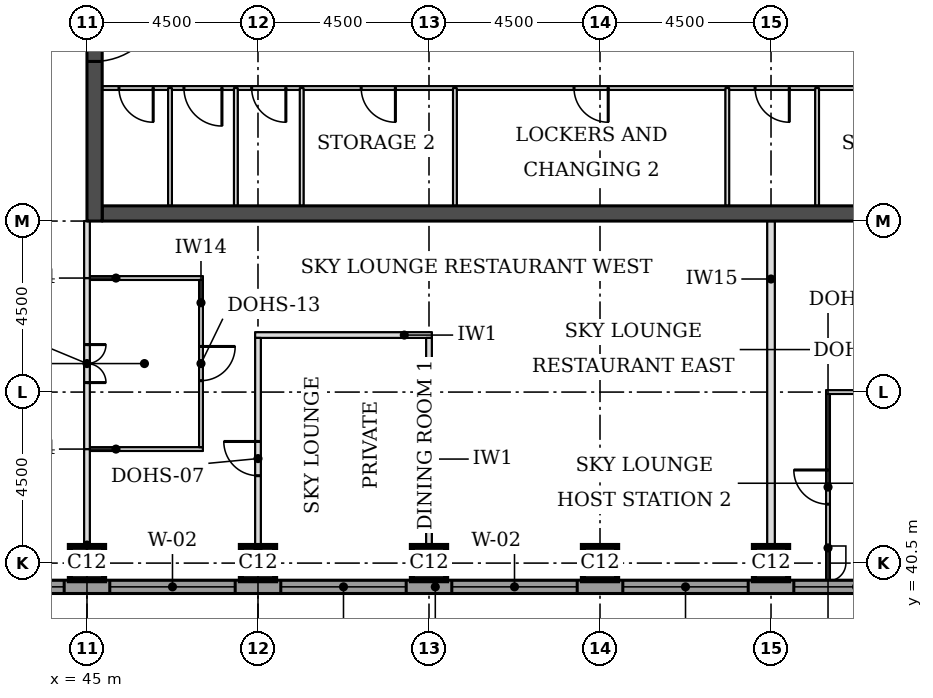
"""IFC4 building model, lengths in metres.
Left out: names, types, materials, properties, quantities, classifications, styles, units other than length and angle.
Written with IfcOpenShell. Run it as: python <this file> out.ifc"""

import sys

from ifc_helpers import new_model, si_unit, direction, frame, frame_2d, origin, origin_2d, place, context, subcontext, project, spatial, rectangle, extrude, element, fill, save


model = new_model("IFC4")
c1 = context("Model", 3, precision=1e-05, world=origin(), true_north=direction((0.0, 1.0)))
c2 = subcontext(c1, "Body", "Model", "MODEL_VIEW")
j1 = project(units=[si_unit("LENGTHUNIT", "METRE"), si_unit("PLANEANGLEUNIT", "RADIAN")], contexts=[c1])
p1 = place(None, origin())
s1 = spatial("IfcSite", under=j1, at=p1, CompositionType="ELEMENT")
p2 = place(p1, origin())
s2 = spatial("IfcBuilding", under=s1, at=p2, CompositionType="ELEMENT")
p3 = place(p2, frame((0.0, 0.0, 260.0)))
s3 = spatial("IfcBuildingStorey", under=s2, at=p3, CompositionType="ELEMENT", Elevation=260.0)
for number, where, z_axis, x_axis in (
    (1, (45.0, 40.5, 0.0), (0.0, 0.0, 1.0), (1.0, 0.0, 0.0)),
    (2, (49.5, 40.5, 0.0), (0.0, 0.0, 1.0), (1.0, 0.0, 0.0)),
    (3, (54.0, 40.5, 0.0), (0.0, 0.0, 1.0), (1.0, 0.0, 0.0)),
    (4, (58.5, 40.5, 0.0), (0.0, 0.0, 1.0), (1.0, 0.0, 0.0)),
    (5, (63.0, 40.5, 0.0), (0.0, 0.0, 1.0), (1.0, 0.0, 0.0)),
):
    element("IfcColumn", number, at=place(p3, frame(where, z_axis=z_axis, x_axis=x_axis)), inside=s3, PredefinedType="COLUMN", context=c2, shape_type="SweptSolid", body=[
        extrude(rectangle(XDim=0.9, YDim=0.9, at=origin_2d()), origin(), (0.0, 0.0, 1.0), 3.7),
    ])
p4 = place(p3, frame((45.4, 49.7, 0.0), z_axis=(0.0, 0.0, 1.0), x_axis=(1.0, 0.0, 0.0)))
e6 = element("IfcWall", 6, at=p4, inside=s3, PredefinedType="SHEAR", context=c2, shape_type="SweptSolid", body=[
    extrude(rectangle(XDim=21.7, YDim=0.4, at=frame_2d((10.85, 0.0))), origin(), (0.0, 0.0, 1.0), 3.7),
])
p5 = place(p3, frame((45.2, 49.5, 0.0), z_axis=(0.0, 0.0, 1.0), x_axis=(0.0, 1.0, 0.0)))
e7 = element("IfcWall", 7, at=p5, inside=s3, PredefinedType="SHEAR", context=c2, shape_type="SweptSolid", body=[
    extrude(rectangle(XDim=22.5, YDim=0.4, at=frame_2d((11.25, 0.0))), origin(), (0.0, 0.0, 1.0), 3.7),
])
p6 = place(p5, frame((4.2, 0.0, 0.0)))
e8 = element("IfcOpeningElement", 8, at=p6, cuts=e7, PredefinedType="OPENING", context=c2, shape_type="SweptSolid", body=[
    extrude(rectangle(XDim=1.8, YDim=2.1, at=frame_2d((0.9, 1.05))), frame((0.0, 0.21, 0.0), z_axis=(0.0, -1.0, 0.0), x_axis=(1.0, 0.0, 0.0)), (0.0, 0.0, 1.0), 0.42),
])
p7 = place(p5, frame((6.9, 0.0, 0.0)))
e9 = element("IfcOpeningElement", 9, at=p7, cuts=e7, PredefinedType="OPENING", context=c2, shape_type="SweptSolid", body=[
    extrude(rectangle(XDim=1.1, YDim=2.1, at=frame_2d((0.55, 1.05))), frame((0.0, 0.21, 0.0), z_axis=(0.0, -1.0, 0.0), x_axis=(1.0, 0.0, 0.0)), (0.0, 0.0, 1.0), 0.42),
])
p8 = place(p5, frame((13.6, 0.0, 0.0)))
e10 = element("IfcOpeningElement", 10, at=p8, cuts=e7, PredefinedType="OPENING", context=c2, shape_type="SweptSolid", body=[
    extrude(rectangle(XDim=1.1, YDim=2.1, at=frame_2d((0.55, 1.05))), frame((0.0, 0.21, 0.0), z_axis=(0.0, -1.0, 0.0), x_axis=(1.0, 0.0, 0.0)), (0.0, 0.0, 1.0), 0.42),
])
p9 = place(p5, frame((16.5, 0.0, 0.0)))
e11 = element("IfcOpeningElement", 11, at=p9, cuts=e7, PredefinedType="OPENING", context=c2, shape_type="SweptSolid", body=[
    extrude(rectangle(XDim=1.8, YDim=2.1, at=frame_2d((0.9, 1.05))), frame((0.0, 0.21, 0.0), z_axis=(0.0, -1.0, 0.0), x_axis=(1.0, 0.0, 0.0)), (0.0, 0.0, 1.0), 0.42),
])
p10 = place(p3, frame((36.0, 39.875, 0.0), z_axis=(0.0, 0.0, 1.0), x_axis=(1.0, 0.0, 0.0)))
e12 = element("IfcWall", 12, at=p10, inside=s3, PredefinedType="STANDARD", context=c2, shape_type="SweptSolid", body=[
    extrude(rectangle(XDim=36.331, YDim=0.35, at=frame_2d((18.166, 0.0))), origin(), (0.0, 0.0, 1.0), 3.425),
])
p11 = place(p10, frame((0.6, 0.0, 0.9)))
e13 = element("IfcOpeningElement", 13, at=p11, cuts=e12, PredefinedType="OPENING", context=c2, shape_type="SweptSolid", body=[
    extrude(rectangle(XDim=3.3, YDim=1.9, at=frame_2d((1.65, 0.95))), frame((0.0, 0.185, 0.0), z_axis=(0.0, -1.0, 0.0), x_axis=(1.0, 0.0, 0.0)), (0.0, 0.0, 1.0), 0.37),
])
p12 = place(p10, frame((5.1, 0.0, 0.9)))
e14 = element("IfcOpeningElement", 14, at=p12, cuts=e12, PredefinedType="OPENING", context=c2, shape_type="SweptSolid", body=[
    extrude(rectangle(XDim=3.3, YDim=1.9, at=frame_2d((1.65, 0.95))), frame((0.0, 0.185, 0.0), z_axis=(0.0, -1.0, 0.0), x_axis=(1.0, 0.0, 0.0)), (0.0, 0.0, 1.0), 0.37),
])
p13 = place(p10, frame((9.6, 0.0, 0.9)))
e15 = element("IfcOpeningElement", 15, at=p13, cuts=e12, PredefinedType="OPENING", context=c2, shape_type="SweptSolid", body=[
    extrude(rectangle(XDim=3.3, YDim=1.9, at=frame_2d((1.65, 0.95))), frame((0.0, 0.185, 0.0), z_axis=(0.0, -1.0, 0.0), x_axis=(1.0, 0.0, 0.0)), (0.0, 0.0, 1.0), 0.37),
])
p14 = place(p10, frame((14.1, 0.0, 0.9)))
e16 = element("IfcOpeningElement", 16, at=p14, cuts=e12, PredefinedType="OPENING", context=c2, shape_type="SweptSolid", body=[
    extrude(rectangle(XDim=3.3, YDim=1.9, at=frame_2d((1.65, 0.95))), frame((0.0, 0.185, 0.0), z_axis=(0.0, -1.0, 0.0), x_axis=(1.0, 0.0, 0.0)), (0.0, 0.0, 1.0), 0.37),
])
p15 = place(p10, frame((18.6, 0.0, 0.9)))
e17 = element("IfcOpeningElement", 17, at=p15, cuts=e12, PredefinedType="OPENING", context=c2, shape_type="SweptSolid", body=[
    extrude(rectangle(XDim=3.3, YDim=1.9, at=frame_2d((1.65, 0.95))), frame((0.0, 0.185, 0.0), z_axis=(0.0, -1.0, 0.0), x_axis=(1.0, 0.0, 0.0)), (0.0, 0.0, 1.0), 0.37),
])
p16 = place(p10, frame((23.1, 0.0, 0.9)))
e18 = element("IfcOpeningElement", 18, at=p16, cuts=e12, PredefinedType="OPENING", context=c2, shape_type="SweptSolid", body=[
    extrude(rectangle(XDim=3.3, YDim=1.9, at=frame_2d((1.65, 0.95))), frame((0.0, 0.185, 0.0), z_axis=(0.0, -1.0, 0.0), x_axis=(1.0, 0.0, 0.0)), (0.0, 0.0, 1.0), 0.37),
])
p17 = place(p10, frame((27.6, 0.0, 0.9)))
e19 = element("IfcOpeningElement", 19, at=p17, cuts=e12, PredefinedType="OPENING", context=c2, shape_type="SweptSolid", body=[
    extrude(rectangle(XDim=3.3, YDim=1.9, at=frame_2d((1.65, 0.95))), frame((0.0, 0.185, 0.0), z_axis=(0.0, -1.0, 0.0), x_axis=(1.0, 0.0, 0.0)), (0.0, 0.0, 1.0), 0.37),
])
p18 = place(p10, frame((32.1, 0.0, 0.9)))
e20 = element("IfcOpeningElement", 20, at=p18, cuts=e12, PredefinedType="OPENING", context=c2, shape_type="SweptSolid", body=[
    extrude(rectangle(XDim=3.3, YDim=1.9, at=frame_2d((1.65, 0.95))), frame((0.0, 0.185, 0.0), z_axis=(0.0, -1.0, 0.0), x_axis=(1.0, 0.0, 0.0)), (0.0, 0.0, 1.0), 0.37),
])
for number, where, z_axis, x_axis in (
    (21, (45.075, 43.5, 0.0), (0.0, 0.0, 1.0), (1.0, 0.0, 0.0)),
    (22, (64.45, 45.0, 0.0), (0.0, 0.0, 1.0), (1.0, 0.0, 0.0)),
):
    element("IfcWall", number, at=place(p3, frame(where, z_axis=z_axis, x_axis=x_axis)), inside=s3, PredefinedType="PARTITIONING", context=c2, shape_type="SweptSolid", body=[
        extrude(rectangle(XDim=2.975, YDim=0.1, at=frame_2d((1.488, 0.0))), origin(), (0.0, 0.0, 1.0), 3.45),
    ])
p19 = place(p3, frame((49.425, 46.5, 0.0), z_axis=(0.0, 0.0, 1.0), x_axis=(1.0, 0.0, 0.0)))
e23 = element("IfcWall", 23, at=p19, inside=s3, PredefinedType="PARTITIONING", context=c2, shape_type="SweptSolid", body=[
    extrude(rectangle(XDim=4.65, YDim=0.15, at=frame_2d((2.325, 0.0))), origin(), (0.0, 0.0, 1.0), 3.45),
])
p20 = place(p3, frame((45.075, 48.0, 0.0), z_axis=(0.0, 0.0, 1.0), x_axis=(1.0, 0.0, 0.0)))
e24 = element("IfcWall", 24, at=p20, inside=s3, PredefinedType="PARTITIONING", context=c2, shape_type="SweptSolid", body=[
    extrude(rectangle(XDim=2.975, YDim=0.1, at=frame_2d((1.488, 0.0))), origin(), (0.0, 0.0, 1.0), 3.45),
])
p21 = place(p3, frame((45.0, 40.05, 0.0), z_axis=(0.0, 0.0, 1.0), x_axis=(0.0, 1.0, 0.0)))
e25 = element("IfcWall", 25, at=p21, inside=s3, PredefinedType="PARTITIONING", context=c2, shape_type="SweptSolid", body=[
    extrude(rectangle(XDim=3.45, YDim=0.15, at=frame_2d((1.725, 0.0))), origin(), (0.0, 0.0, 1.0), 2.922),
])
p22 = place(p3, frame((49.5, 40.05, 0.0), z_axis=(0.0, 0.0, 1.0), x_axis=(0.0, 1.0, 0.0)))
e26 = element("IfcWall", 26, at=p22, inside=s3, PredefinedType="PARTITIONING", context=c2, shape_type="SweptSolid", body=[
    extrude(rectangle(XDim=6.375, YDim=0.15, at=frame_2d((3.188, 0.0))), origin(), (0.0, 0.0, 1.0), 3.45),
])
p23 = place(p22, frame((2.75, 0.0, 0.0)))
e27 = element("IfcOpeningElement", 27, at=p23, cuts=e26, PredefinedType="OPENING", context=c2, shape_type="SweptSolid", body=[
    extrude(rectangle(XDim=0.9, YDim=2.1, at=frame_2d((0.45, 1.05))), frame((0.0, 0.085, 0.0), z_axis=(0.0, -1.0, 0.0), x_axis=(1.0, 0.0, 0.0)), (0.0, 0.0, 1.0), 0.17),
])
p24 = place(p3, frame((54.0, 40.05, 0.0), z_axis=(0.0, 0.0, 1.0), x_axis=(0.0, 1.0, 0.0)))
e28 = element("IfcWall", 28, at=p24, inside=s3, PredefinedType="PARTITIONING", context=c2, shape_type="SweptSolid", body=[
    extrude(rectangle(XDim=6.375, YDim=0.15, at=frame_2d((3.188, 0.0))), origin(), (0.0, 0.0, 1.0), 3.45),
])
p25 = place(p3, frame((63.0, 40.05, 0.0), z_axis=(0.0, 0.0, 1.0), x_axis=(0.0, 1.0, 0.0)))
e29 = element("IfcWall", 29, at=p25, inside=s3, PredefinedType="PARTITIONING", context=c2, shape_type="SweptSolid", body=[
    extrude(rectangle(XDim=9.45, YDim=0.2, at=frame_2d((4.725, 0.0))), origin(), (0.0, 0.0, 1.0), 3.45),
])
p26 = place(p3, frame((64.5, 40.05, 0.0), z_axis=(0.0, 0.0, 1.0), x_axis=(0.0, 1.0, 0.0)))
e30 = element("IfcWall", 30, at=p26, inside=s3, PredefinedType="PARTITIONING", context=c2, shape_type="SweptSolid", body=[
    extrude(rectangle(XDim=4.9, YDim=0.1, at=frame_2d((2.45, 0.0))), origin(), (0.0, 0.0, 1.0), 3.45),
])
p27 = place(p26, frame((2.0, 0.0, 0.0)))
e31 = element("IfcOpeningElement", 31, at=p27, cuts=e30, PredefinedType="OPENING", context=c2, shape_type="SweptSolid", body=[
    extrude(rectangle(XDim=0.9, YDim=2.1, at=frame_2d((0.45, 1.05))), frame((0.0, 0.06, 0.0), z_axis=(0.0, -1.0, 0.0), x_axis=(1.0, 0.0, 0.0)), (0.0, 0.0, 1.0), 0.12),
])
p28 = place(p3, frame((45.0, 43.5, 0.0), z_axis=(0.0, 0.0, 1.0), x_axis=(0.0, 1.0, 0.0)))
e32 = element("IfcWall", 32, at=p28, inside=s3, PredefinedType="PARTITIONING", context=c2, shape_type="SweptSolid", body=[
    extrude(rectangle(XDim=4.5, YDim=0.15, at=frame_2d((2.25, 0.0))), origin(), (0.0, 0.0, 1.0), 2.922),
])
p29 = place(p28, frame((1.75, 0.0, 0.0)))
e33 = element("IfcOpeningElement", 33, at=p29, cuts=e32, PredefinedType="OPENING", context=c2, shape_type="SweptSolid", body=[
    extrude(rectangle(XDim=1.0, YDim=2.1, at=frame_2d((0.5, 1.05))), frame((0.0, 0.085, 0.0), z_axis=(0.0, -1.0, 0.0), x_axis=(1.0, 0.0, 0.0)), (0.0, 0.0, 1.0), 0.17),
])
p30 = place(p3, frame((48.0, 43.55, 0.0), z_axis=(0.0, 0.0, 1.0), x_axis=(0.0, 1.0, 0.0)))
e34 = element("IfcWall", 34, at=p30, inside=s3, PredefinedType="PARTITIONING", context=c2, shape_type="SweptSolid", body=[
    extrude(rectangle(XDim=4.4, YDim=0.1, at=frame_2d((2.2, 0.0))), origin(), (0.0, 0.0, 1.0), 3.45),
])
p31 = place(p30, frame((1.75, 0.0, 0.0)))
e35 = element("IfcOpeningElement", 35, at=p31, cuts=e34, PredefinedType="OPENING", context=c2, shape_type="SweptSolid", body=[
    extrude(rectangle(XDim=0.9, YDim=2.1, at=frame_2d((0.45, 1.05))), frame((0.0, 0.06, 0.0), z_axis=(0.0, -1.0, 0.0), x_axis=(1.0, 0.0, 0.0)), (0.0, 0.0, 1.0), 0.12),
])
p32 = place(p3, frame((45.0, 48.0, 0.0), z_axis=(0.0, 0.0, 1.0), x_axis=(0.0, 1.0, 0.0)))
e36 = element("IfcWall", 36, at=p32, inside=s3, PredefinedType="PARTITIONING", context=c2, shape_type="SweptSolid", body=[
    extrude(rectangle(XDim=1.5, YDim=0.15, at=frame_2d((0.75, 0.0))), origin(), (0.0, 0.0, 1.0), 2.922),
])
p33 = place(p3, frame((45.4, 53.0, 0.0), z_axis=(0.0, 0.0, 1.0), x_axis=(1.0, 0.0, 0.0)))
e37 = element("IfcWall", 37, at=p33, inside=s3, PredefinedType="PARTITIONING", context=c2, shape_type="SweptSolid", body=[
    extrude(rectangle(XDim=21.7, YDim=0.1, at=frame_2d((10.85, 0.0))), origin(), (0.0, 0.0, 1.0), 3.45),
])
p34 = place(p33, frame((19.806, 0.0, 0.0)))
e38 = element("IfcOpeningElement", 38, at=p34, cuts=e37, PredefinedType="OPENING", context=c2, shape_type="SweptSolid", body=[
    extrude(rectangle(XDim=0.9, YDim=2.1, at=frame_2d((0.45, 1.05))), frame((0.0, 0.06, 0.0), z_axis=(0.0, -1.0, 0.0), x_axis=(1.0, 0.0, 0.0)), (0.0, 0.0, 1.0), 0.12),
])
p35 = place(p33, frame((17.181, 0.0, 0.0)))
e39 = element("IfcOpeningElement", 39, at=p35, cuts=e37, PredefinedType="OPENING", context=c2, shape_type="SweptSolid", body=[
    extrude(rectangle(XDim=0.9, YDim=2.1, at=frame_2d((0.45, 1.05))), frame((0.0, 0.06, 0.0), z_axis=(0.0, -1.0, 0.0), x_axis=(1.0, 0.0, 0.0)), (0.0, 0.0, 1.0), 0.12),
])
p36 = place(p33, frame((0.442, 0.0, 0.0)))
e40 = element("IfcOpeningElement", 40, at=p36, cuts=e37, PredefinedType="OPENING", context=c2, shape_type="SweptSolid", body=[
    extrude(rectangle(XDim=0.9, YDim=2.1, at=frame_2d((0.45, 1.05))), frame((0.0, 0.06, 0.0), z_axis=(0.0, -1.0, 0.0), x_axis=(1.0, 0.0, 0.0)), (0.0, 0.0, 1.0), 0.12),
])
p37 = place(p33, frame((2.151, 0.0, 0.0)))
e41 = element("IfcOpeningElement", 41, at=p37, cuts=e37, PredefinedType="OPENING", context=c2, shape_type="SweptSolid", body=[
    extrude(rectangle(XDim=1.0, YDim=2.1, at=frame_2d((0.5, 1.05))), frame((0.0, 0.06, 0.0), z_axis=(0.0, -1.0, 0.0), x_axis=(1.0, 0.0, 0.0)), (0.0, 0.0, 1.0), 0.12),
])
p38 = place(p33, frame((3.934, 0.0, 0.0)))
e42 = element("IfcOpeningElement", 42, at=p38, cuts=e37, PredefinedType="OPENING", context=c2, shape_type="SweptSolid", body=[
    extrude(rectangle(XDim=0.9, YDim=2.1, at=frame_2d((0.45, 1.05))), frame((0.0, 0.06, 0.0), z_axis=(0.0, -1.0, 0.0), x_axis=(1.0, 0.0, 0.0)), (0.0, 0.0, 1.0), 0.12),
])
p39 = place(p33, frame((6.816, 0.0, 0.0)))
e43 = element("IfcOpeningElement", 43, at=p39, cuts=e37, PredefinedType="OPENING", context=c2, shape_type="SweptSolid", body=[
    extrude(rectangle(XDim=0.9, YDim=2.1, at=frame_2d((0.45, 1.05))), frame((0.0, 0.06, 0.0), z_axis=(0.0, -1.0, 0.0), x_axis=(1.0, 0.0, 0.0)), (0.0, 0.0, 1.0), 0.12),
])
p40 = place(p33, frame((12.416, 0.0, 0.0)))
e44 = element("IfcOpeningElement", 44, at=p40, cuts=e37, PredefinedType="OPENING", context=c2, shape_type="SweptSolid", body=[
    extrude(rectangle(XDim=0.9, YDim=2.1, at=frame_2d((0.45, 1.05))), frame((0.0, 0.06, 0.0), z_axis=(0.0, -1.0, 0.0), x_axis=(1.0, 0.0, 0.0)), (0.0, 0.0, 1.0), 0.12),
])
for number, where, z_axis, x_axis in (
    (45, (47.185, 49.9, 0.0), (0.0, 0.0, 1.0), (0.0, 1.0, 0.0)),
    (46, (48.917, 49.9, 0.0), (0.0, 0.0, 1.0), (0.0, 1.0, 0.0)),
    (47, (50.65, 49.9, 0.0), (0.0, 0.0, 1.0), (0.0, 1.0, 0.0)),
    (48, (54.682, 49.9, 0.0), (0.0, 0.0, 1.0), (0.0, 1.0, 0.0)),
    (49, (61.85, 49.9, 0.0), (0.0, 0.0, 1.0), (0.0, 1.0, 0.0)),
    (50, (64.212, 49.9, 0.0), (0.0, 0.0, 1.0), (0.0, 1.0, 0.0)),
):
    element("IfcWall", number, at=place(p3, frame(where, z_axis=z_axis, x_axis=x_axis)), inside=s3, PredefinedType="PARTITIONING", context=c2, shape_type="SweptSolid", body=[
        extrude(rectangle(XDim=3.1, YDim=0.1, at=frame_2d((1.55, 0.0))), origin(), (0.0, 0.0, 1.0), 3.45),
    ])
p41 = place(p12, origin())
e51 = element("IfcWindow", 51, at=p41, inside=s3, PartitioningType="SINGLE_PANEL", PredefinedType="WINDOW", context=c2, shape_type="SweptSolid", body=[
    extrude(rectangle(XDim=3.3, YDim=1.9, at=frame_2d((1.65, 0.95))), frame((0.0, 0.085, 0.0), z_axis=(0.0, -1.0, 0.0), x_axis=(1.0, 0.0, 0.0)), (0.0, 0.0, 1.0), 0.06),
])
fill(e14, e51)
p42 = place(p13, origin())
e52 = element("IfcWindow", 52, at=p42, inside=s3, PartitioningType="SINGLE_PANEL", PredefinedType="WINDOW", context=c2, shape_type="SweptSolid", body=[
    extrude(rectangle(XDim=3.3, YDim=1.9, at=frame_2d((1.65, 0.95))), frame((0.0, 0.085, 0.0), z_axis=(0.0, -1.0, 0.0), x_axis=(1.0, 0.0, 0.0)), (0.0, 0.0, 1.0), 0.06),
])
fill(e15, e52)
p43 = place(p14, origin())
e53 = element("IfcWindow", 53, at=p43, inside=s3, PartitioningType="SINGLE_PANEL", PredefinedType="WINDOW", context=c2, shape_type="SweptSolid", body=[
    extrude(rectangle(XDim=3.3, YDim=1.9, at=frame_2d((1.65, 0.95))), frame((0.0, 0.085, 0.0), z_axis=(0.0, -1.0, 0.0), x_axis=(1.0, 0.0, 0.0)), (0.0, 0.0, 1.0), 0.06),
])
fill(e16, e53)
p44 = place(p15, origin())
e54 = element("IfcWindow", 54, at=p44, inside=s3, PartitioningType="SINGLE_PANEL", PredefinedType="WINDOW", context=c2, shape_type="SweptSolid", body=[
    extrude(rectangle(XDim=3.3, YDim=1.9, at=frame_2d((1.65, 0.95))), frame((0.0, 0.085, 0.0), z_axis=(0.0, -1.0, 0.0), x_axis=(1.0, 0.0, 0.0)), (0.0, 0.0, 1.0), 0.06),
])
fill(e17, e54)
p45 = place(p16, origin())
e55 = element("IfcWindow", 55, at=p45, inside=s3, PartitioningType="SINGLE_PANEL", PredefinedType="WINDOW", context=c2, shape_type="SweptSolid", body=[
    extrude(rectangle(XDim=3.3, YDim=1.9, at=frame_2d((1.65, 0.95))), frame((0.0, 0.085, 0.0), z_axis=(0.0, -1.0, 0.0), x_axis=(1.0, 0.0, 0.0)), (0.0, 0.0, 1.0), 0.06),
])
fill(e18, e55)
p46 = place(p17, origin())
e56 = element("IfcWindow", 56, at=p46, inside=s3, PartitioningType="SINGLE_PANEL", PredefinedType="WINDOW", context=c2, shape_type="SweptSolid", body=[
    extrude(rectangle(XDim=3.3, YDim=1.9, at=frame_2d((1.65, 0.95))), frame((0.0, 0.085, 0.0), z_axis=(0.0, -1.0, 0.0), x_axis=(1.0, 0.0, 0.0)), (0.0, 0.0, 1.0), 0.06),
])
fill(e19, e56)
p47 = place(p29, frame((1.0, 0.0, 0.0), z_axis=(0.0, 0.0, 1.0), x_axis=(-1.0, 0.0, 0.0)))
e57 = element("IfcDoor", 57, at=p47, inside=s3, OperationType="DOUBLE_DOOR_SINGLE_SWING", PredefinedType="DOOR", context=c2, shape_type="SweptSolid", body=[
    extrude(rectangle(XDim=1.0, YDim=2.1, at=frame_2d((0.5, 1.05))), frame((0.0, 0.025, 0.0), z_axis=(0.0, -1.0, 0.0), x_axis=(1.0, 0.0, 0.0)), (0.0, 0.0, 1.0), 0.05),
])
fill(e33, e57)
p48 = place(p31, frame((0.9, 0.0, 0.0), z_axis=(0.0, 0.0, 1.0), x_axis=(-1.0, 0.0, 0.0)))
e58 = element("IfcDoor", 58, at=p48, inside=s3, OperationType="SINGLE_SWING_LEFT", PredefinedType="DOOR", context=c2, shape_type="SweptSolid", body=[
    extrude(rectangle(XDim=0.9, YDim=2.1, at=frame_2d((0.45, 1.05))), frame((0.0, 0.025, 0.0), z_axis=(0.0, -1.0, 0.0), x_axis=(1.0, 0.0, 0.0)), (0.0, 0.0, 1.0), 0.05),
])
fill(e35, e58)
p49 = place(p23, origin())
e59 = element("IfcDoor", 59, at=p49, inside=s3, OperationType="SINGLE_SWING_RIGHT", PredefinedType="DOOR", context=c2, shape_type="SweptSolid", body=[
    extrude(rectangle(XDim=0.9, YDim=2.1, at=frame_2d((0.45, 1.05))), frame((0.0, 0.025, 0.0), z_axis=(0.0, -1.0, 0.0), x_axis=(1.0, 0.0, 0.0)), (0.0, 0.0, 1.0), 0.05),
])
fill(e27, e59)
p50 = place(p27, origin())
e60 = element("IfcDoor", 60, at=p50, inside=s3, OperationType="SINGLE_SWING_RIGHT", PredefinedType="DOOR", context=c2, shape_type="SweptSolid", body=[
    extrude(rectangle(XDim=0.9, YDim=2.1, at=frame_2d((0.45, 1.05))), frame((0.0, 0.025, 0.0), z_axis=(0.0, -1.0, 0.0), x_axis=(1.0, 0.0, 0.0)), (0.0, 0.0, 1.0), 0.05),
])
fill(e31, e60)
p51 = place(p6, frame((1.8, 0.0, 0.0), z_axis=(0.0, 0.0, 1.0), x_axis=(-1.0, 0.0, 0.0)))
e61 = element("IfcDoor", 61, at=p51, inside=s3, OperationType="SINGLE_SWING_LEFT", PredefinedType="DOOR", context=c2, shape_type="SweptSolid", body=[
    extrude(rectangle(XDim=1.8, YDim=2.1, at=frame_2d((0.9, 1.05))), frame((0.0, 0.025, 0.0), z_axis=(0.0, -1.0, 0.0), x_axis=(1.0, 0.0, 0.0)), (0.0, 0.0, 1.0), 0.05),
])
fill(e8, e61)
p52 = place(p35, frame((0.9, 0.0, 0.0), z_axis=(0.0, 0.0, 1.0), x_axis=(-1.0, 0.0, 0.0)))
e62 = element("IfcDoor", 62, at=p52, inside=s3, OperationType="SINGLE_SWING_LEFT", PredefinedType="DOOR", context=c2, shape_type="SweptSolid", body=[
    extrude(rectangle(XDim=0.9, YDim=2.1, at=frame_2d((0.45, 1.05))), frame((0.0, 0.025, 0.0), z_axis=(0.0, -1.0, 0.0), x_axis=(1.0, 0.0, 0.0)), (0.0, 0.0, 1.0), 0.05),
])
fill(e39, e62)
p53 = place(p36, frame((0.9, 0.0, 0.0), z_axis=(0.0, 0.0, 1.0), x_axis=(-1.0, 0.0, 0.0)))
e63 = element("IfcDoor", 63, at=p53, inside=s3, OperationType="SINGLE_SWING_LEFT", PredefinedType="DOOR", context=c2, shape_type="SweptSolid", body=[
    extrude(rectangle(XDim=0.9, YDim=2.1, at=frame_2d((0.45, 1.05))), frame((0.0, 0.025, 0.0), z_axis=(0.0, -1.0, 0.0), x_axis=(1.0, 0.0, 0.0)), (0.0, 0.0, 1.0), 0.05),
])
fill(e40, e63)
p54 = place(p37, frame((1.0, 0.0, 0.0), z_axis=(0.0, 0.0, 1.0), x_axis=(-1.0, 0.0, 0.0)))
e64 = element("IfcDoor", 64, at=p54, inside=s3, OperationType="SINGLE_SWING_LEFT", PredefinedType="DOOR", context=c2, shape_type="SweptSolid", body=[
    extrude(rectangle(XDim=1.0, YDim=2.1, at=frame_2d((0.5, 1.05))), frame((0.0, 0.025, 0.0), z_axis=(0.0, -1.0, 0.0), x_axis=(1.0, 0.0, 0.0)), (0.0, 0.0, 1.0), 0.05),
])
fill(e41, e64)
p55 = place(p38, frame((0.9, 0.0, 0.0), z_axis=(0.0, 0.0, 1.0), x_axis=(-1.0, 0.0, 0.0)))
e65 = element("IfcDoor", 65, at=p55, inside=s3, OperationType="SINGLE_SWING_LEFT", PredefinedType="DOOR", context=c2, shape_type="SweptSolid", body=[
    extrude(rectangle(XDim=0.9, YDim=2.1, at=frame_2d((0.45, 1.05))), frame((0.0, 0.025, 0.0), z_axis=(0.0, -1.0, 0.0), x_axis=(1.0, 0.0, 0.0)), (0.0, 0.0, 1.0), 0.05),
])
fill(e42, e65)
p56 = place(p39, frame((0.9, 0.0, 0.0), z_axis=(0.0, 0.0, 1.0), x_axis=(-1.0, 0.0, 0.0)))
e66 = element("IfcDoor", 66, at=p56, inside=s3, OperationType="SINGLE_SWING_LEFT", PredefinedType="DOOR", context=c2, shape_type="SweptSolid", body=[
    extrude(rectangle(XDim=0.9, YDim=2.1, at=frame_2d((0.45, 1.05))), frame((0.0, 0.025, 0.0), z_axis=(0.0, -1.0, 0.0), x_axis=(1.0, 0.0, 0.0)), (0.0, 0.0, 1.0), 0.05),
])
fill(e43, e66)
p57 = place(p40, frame((0.9, 0.0, 0.0), z_axis=(0.0, 0.0, 1.0), x_axis=(-1.0, 0.0, 0.0)))
e67 = element("IfcDoor", 67, at=p57, inside=s3, OperationType="SINGLE_SWING_LEFT", PredefinedType="DOOR", context=c2, shape_type="SweptSolid", body=[
    extrude(rectangle(XDim=0.9, YDim=2.1, at=frame_2d((0.45, 1.05))), frame((0.0, 0.025, 0.0), z_axis=(0.0, -1.0, 0.0), x_axis=(1.0, 0.0, 0.0)), (0.0, 0.0, 1.0), 0.05),
])
fill(e44, e67)
save(model, sys.argv[1])
